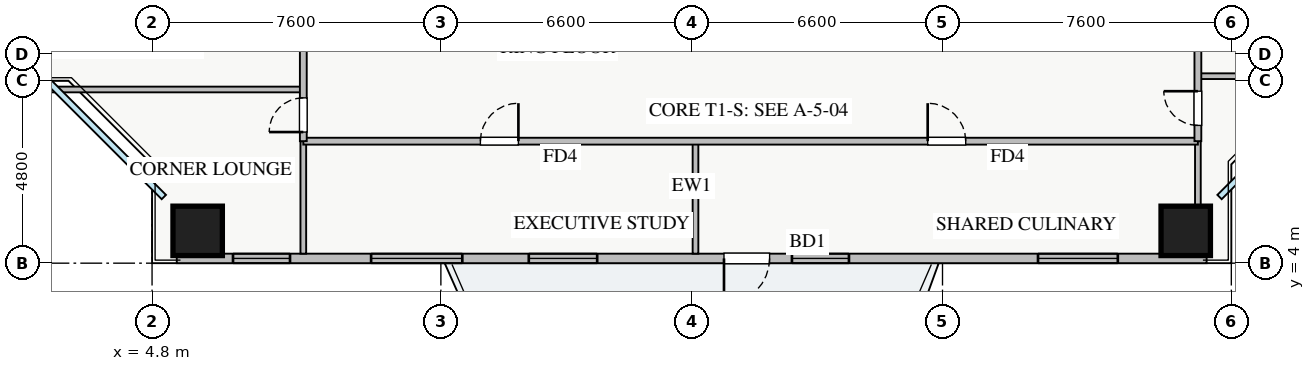
"""IFC4 building model, lengths in metres.
Left out: names, types, materials, properties, quantities, classifications, styles, units other than length and angle.
Written with IfcOpenShell. Run it as: python <this file> out.ifc"""

import sys

from ifc_helpers import new_model, si_unit, direction, frame, frame_2d, origin, origin_2d, place, context, subcontext, project, spatial, rectangle, extrude, source, transform, mapped, element, fill, save


model = new_model("IFC4")
c1 = context("Model", 3, precision=1e-05, world=origin(), true_north=direction((0.0, 1.0)))
c2 = subcontext(c1, "Body", "Model", "MODEL_VIEW")
j1 = project(units=[si_unit("LENGTHUNIT", "METRE"), si_unit("PLANEANGLEUNIT", "RADIAN")], contexts=[c1])
p1 = place(None, origin())
s1 = spatial("IfcSite", under=j1, at=p1, CompositionType="ELEMENT")
p2 = place(p1, origin())
s2 = spatial("IfcBuilding", under=s1, at=p2, CompositionType="ELEMENT")
p3 = place(p2, frame((0.0, 0.0, 76.25)))
s3 = spatial("IfcBuildingStorey", under=s2, at=p3, CompositionType="ELEMENT", Elevation=76.25)
m1 = source(origin(), c2, "Body", "SweptSolid", [
    extrude(rectangle(XDim=1.3, YDim=1.3, at=origin_2d()), origin(), (0.0, 0.0, 1.0), 3.25),
])
for number, where, z_axis, x_axis in (
    (1, (6.0, 4.85, 0.0), (0.0, 0.0, 1.0), (1.0, 0.0, 0.0)),
    (2, (32.0, 4.85, 0.0), (0.0, 0.0, 1.0), (1.0, 0.0, 0.0)),
):
    element("IfcColumn", number, at=place(p3, frame(where, z_axis=z_axis, x_axis=x_axis)), inside=s3, PredefinedType="COLUMN", context=c2, shape_type="MappedRepresentation", body=[
        mapped(m1, transform((0.0, 0.0, 0.0), x_axis=(1.0, 0.0, 0.0), y_axis=(0.0, 1.0, 0.0), z_axis=(0.0, 0.0, 1.0), scale=1.0)),
    ])
p4 = place(p3, frame((5.45, 4.125, 0.0), z_axis=(0.0, 0.0, 1.0), x_axis=(1.0, 0.0, 0.0)))
e3 = element("IfcWall", 3, at=p4, inside=s3, PredefinedType="STANDARD", context=c2, shape_type="SweptSolid", body=[
    extrude(rectangle(XDim=27.1, YDim=0.25, at=frame_2d((13.55, 0.0))), origin(), (0.0, 0.0, 1.0), 2.61),
])
p5 = place(p4, frame((14.4, 0.0, 0.0)))
e4 = element("IfcOpeningElement", 4, at=p5, cuts=e3, PredefinedType="OPENING", context=c2, shape_type="SweptSolid", body=[
    extrude(rectangle(XDim=1.2, YDim=2.1, at=frame_2d((0.6, 1.05))), frame((0.0, 0.135, 0.0), z_axis=(0.0, -1.0, 0.0), x_axis=(1.0, 0.0, 0.0)), (0.0, 0.0, 1.0), 0.27),
])
p6 = place(p4, frame((1.48, 0.0, 0.9)))
e5 = element("IfcOpeningElement", 5, at=p6, cuts=e3, PredefinedType="OPENING", context=c2, shape_type="SweptSolid", body=[
    extrude(rectangle(XDim=1.5, YDim=1.5, at=frame_2d((0.75, 0.75))), frame((0.0, 0.135, 0.0), z_axis=(0.0, -1.0, 0.0), x_axis=(1.0, 0.0, 0.0)), (0.0, 0.0, 1.0), 0.27),
])
p7 = place(p4, frame((9.263, 0.0, 0.9)))
e6 = element("IfcOpeningElement", 6, at=p7, cuts=e3, PredefinedType="OPENING", context=c2, shape_type="SweptSolid", body=[
    extrude(rectangle(XDim=1.8, YDim=1.45, at=frame_2d((0.9, 0.725))), frame((0.0, 0.135, 0.0), z_axis=(0.0, -1.0, 0.0), x_axis=(1.0, 0.0, 0.0)), (0.0, 0.0, 1.0), 0.27),
])
p8 = place(p4, frame((16.188, 0.0, 0.9)))
e7 = element("IfcOpeningElement", 7, at=p8, cuts=e3, PredefinedType="OPENING", context=c2, shape_type="SweptSolid", body=[
    extrude(rectangle(XDim=1.5, YDim=1.45, at=frame_2d((0.75, 0.725))), frame((0.0, 0.135, 0.0), z_axis=(0.0, -1.0, 0.0), x_axis=(1.0, 0.0, 0.0)), (0.0, 0.0, 1.0), 0.27),
])
p9 = place(p4, frame((22.663, 0.0, 0.9)))
e8 = element("IfcOpeningElement", 8, at=p9, cuts=e3, PredefinedType="OPENING", context=c2, shape_type="SweptSolid", body=[
    extrude(rectangle(XDim=2.1, YDim=1.48, at=frame_2d((1.05, 0.74))), frame((0.0, 0.135, 0.0), z_axis=(0.0, -1.0, 0.0), x_axis=(1.0, 0.0, 0.0)), (0.0, 0.0, 1.0), 0.27),
])
p10 = place(p4, frame((5.114, 0.0, 0.9)))
e9 = element("IfcOpeningElement", 9, at=p10, cuts=e3, PredefinedType="OPENING", context=c2, shape_type="SweptSolid", body=[
    extrude(rectangle(XDim=2.4, YDim=1.5, at=frame_2d((1.2, 0.75))), frame((0.0, 0.135, 0.0), z_axis=(0.0, -1.0, 0.0), x_axis=(1.0, 0.0, 0.0)), (0.0, 0.0, 1.0), 0.27),
])
p11 = place(p3, frame((19.1, 4.25, 0.0), z_axis=(0.0, 0.0, 1.0), x_axis=(0.0, 1.0, 0.0)))
e10 = element("IfcWall", 10, at=p11, inside=s3, PredefinedType="PARTITIONING", context=c2, shape_type="SweptSolid", body=[
    extrude(rectangle(XDim=2.96, YDim=0.15, at=frame_2d((1.48, 0.0))), origin(), (0.0, 0.0, 1.0), 2.815),
])
for number, where, z_axis, x_axis in (
    (11, (8.78, 4.25, 0.0), (0.0, 0.0, 1.0), (0.0, 1.0, 0.0)),
    (12, (32.32, 4.25, 0.0), (0.0, 0.0, 1.0), (0.0, 1.0, 0.0)),
):
    element("IfcWall", number, at=place(p3, frame(where, z_axis=z_axis, x_axis=x_axis)), inside=s3, PredefinedType="PARTITIONING", context=c2, shape_type="SweptSolid", body=[
        extrude(rectangle(XDim=2.96, YDim=0.15, at=frame_2d((1.48, 0.0))), origin(), (0.0, 0.0, 1.0), 3.07),
    ])
p12 = place(p3, frame((8.78, 7.21, 0.0), z_axis=(0.0, 0.0, 1.0), x_axis=(1.0, 0.0, 0.0)))
e13 = element("IfcWall", 13, at=p12, inside=s3, PredefinedType="PARTITIONING", context=c2, shape_type="SweptSolid", body=[
    extrude(rectangle(XDim=23.54, YDim=0.18, at=frame_2d((11.77, 0.0))), origin(), (0.0, 0.0, 1.0), 3.07),
])
p13 = place(p12, frame((4.66, 0.0, 0.0)))
e14 = element("IfcOpeningElement", 14, at=p13, cuts=e13, PredefinedType="OPENING", context=c2, shape_type="SweptSolid", body=[
    extrude(rectangle(XDim=1.0, YDim=2.05, at=frame_2d((0.5, 1.025))), frame((0.0, 0.1, 0.0), z_axis=(0.0, -1.0, 0.0), x_axis=(1.0, 0.0, 0.0)), (0.0, 0.0, 1.0), 0.2),
])
p14 = place(p12, frame((16.43, 0.0, 0.0)))
e15 = element("IfcOpeningElement", 15, at=p14, cuts=e13, PredefinedType="OPENING", context=c2, shape_type="SweptSolid", body=[
    extrude(rectangle(XDim=1.0, YDim=2.05, at=frame_2d((0.5, 1.025))), frame((0.0, 0.1, 0.0), z_axis=(0.0, -1.0, 0.0), x_axis=(1.0, 0.0, 0.0)), (0.0, 0.0, 1.0), 0.2),
])
p15 = place(p3, frame((0.25, 8.57, 0.0), z_axis=(0.0, 0.0, 1.0), x_axis=(1.0, 0.0, 0.0)))
e16 = element("IfcWall", 16, at=p15, inside=s3, PredefinedType="PARTITIONING", context=c2, shape_type="SweptSolid", body=[
    extrude(rectangle(XDim=8.53, YDim=0.15, at=frame_2d((4.265, 0.0))), origin(), (0.0, 0.0, 1.0), 3.07),
])
p16 = place(p3, frame((8.78, 7.21, 0.0), z_axis=(0.0, 0.0, 1.0), x_axis=(0.0, 1.0, 0.0)))
e17 = element("IfcWall", 17, at=p16, inside=s3, PredefinedType="PARTITIONING", context=c2, shape_type="SweptSolid", body=[
    extrude(rectangle(XDim=31.23, YDim=0.18, at=frame_2d((15.615, 0.0))), origin(), (0.0, 0.0, 1.0), 3.07),
])
p17 = place(p16, frame((30.09, 0.0, 0.0)))
e18 = element("IfcOpeningElement", 18, at=p17, cuts=e17, PredefinedType="OPENING", context=c2, shape_type="SweptSolid", body=[
    extrude(rectangle(XDim=0.9, YDim=2.05, at=frame_2d((0.45, 1.025))), frame((0.0, 0.1, 0.0), z_axis=(0.0, -1.0, 0.0), x_axis=(1.0, 0.0, 0.0)), (0.0, 0.0, 1.0), 0.2),
])
p18 = place(p16, frame((0.24, 0.0, 0.0)))
e19 = element("IfcOpeningElement", 19, at=p18, cuts=e17, PredefinedType="OPENING", context=c2, shape_type="SweptSolid", body=[
    extrude(rectangle(XDim=0.9, YDim=2.05, at=frame_2d((0.45, 1.025))), frame((0.0, 0.1, 0.0), z_axis=(0.0, -1.0, 0.0), x_axis=(1.0, 0.0, 0.0)), (0.0, 0.0, 1.0), 0.2),
])
p19 = place(p16, frame((2.84, 0.0, 0.0)))
e20 = element("IfcOpeningElement", 20, at=p19, cuts=e17, PredefinedType="OPENING", context=c2, shape_type="SweptSolid", body=[
    extrude(rectangle(XDim=1.0, YDim=2.05, at=frame_2d((0.5, 1.025))), frame((0.0, 0.1, 0.0), z_axis=(0.0, -1.0, 0.0), x_axis=(1.0, 0.0, 0.0)), (0.0, 0.0, 1.0), 0.2),
])
p20 = place(p16, frame((12.11, 0.0, 0.0)))
e21 = element("IfcOpeningElement", 21, at=p20, cuts=e17, PredefinedType="OPENING", context=c2, shape_type="SweptSolid", body=[
    extrude(rectangle(XDim=1.0, YDim=2.05, at=frame_2d((0.5, 1.025))), frame((0.0, 0.1, 0.0), z_axis=(0.0, -1.0, 0.0), x_axis=(1.0, 0.0, 0.0)), (0.0, 0.0, 1.0), 0.2),
])
p21 = place(p16, frame((24.62, 0.0, 0.0)))
e22 = element("IfcOpeningElement", 22, at=p21, cuts=e17, PredefinedType="OPENING", context=c2, shape_type="SweptSolid", body=[
    extrude(rectangle(XDim=1.0, YDim=2.05, at=frame_2d((0.5, 1.025))), frame((0.0, 0.1, 0.0), z_axis=(0.0, -1.0, 0.0), x_axis=(1.0, 0.0, 0.0)), (0.0, 0.0, 1.0), 0.2),
])
p22 = place(p3, frame((32.32, 8.92, 0.0), z_axis=(0.0, 0.0, 1.0), x_axis=(1.0, 0.0, 0.0)))
e23 = element("IfcWall", 23, at=p22, inside=s3, PredefinedType="PARTITIONING", context=c2, shape_type="SweptSolid", body=[
    extrude(rectangle(XDim=5.43, YDim=0.15, at=frame_2d((2.715, 0.0))), origin(), (0.0, 0.0, 1.0), 3.07),
])
p23 = place(p3, frame((32.32, 7.21, 0.0), z_axis=(0.0, 0.0, 1.0), x_axis=(0.0, 1.0, 0.0)))
e24 = element("IfcWall", 24, at=p23, inside=s3, PredefinedType="PARTITIONING", context=c2, shape_type="SweptSolid", body=[
    extrude(rectangle(XDim=31.23, YDim=0.18, at=frame_2d((15.615, 0.0))), origin(), (0.0, 0.0, 1.0), 2.815),
])
p24 = place(p23, frame((30.09, 0.0, 0.0)))
e25 = element("IfcOpeningElement", 25, at=p24, cuts=e24, PredefinedType="OPENING", context=c2, shape_type="SweptSolid", body=[
    extrude(rectangle(XDim=0.9, YDim=2.05, at=frame_2d((0.45, 1.025))), frame((0.0, 0.1, 0.0), z_axis=(0.0, -1.0, 0.0), x_axis=(1.0, 0.0, 0.0)), (0.0, 0.0, 1.0), 0.2),
])
p25 = place(p23, frame((0.415, 0.0, 0.0)))
e26 = element("IfcOpeningElement", 26, at=p25, cuts=e24, PredefinedType="OPENING", context=c2, shape_type="SweptSolid", body=[
    extrude(rectangle(XDim=0.9, YDim=2.05, at=frame_2d((0.45, 1.025))), frame((0.0, 0.1, 0.0), z_axis=(0.0, -1.0, 0.0), x_axis=(1.0, 0.0, 0.0)), (0.0, 0.0, 1.0), 0.2),
])
p26 = place(p23, frame((4.99, 0.0, 0.0)))
e27 = element("IfcOpeningElement", 27, at=p26, cuts=e24, PredefinedType="OPENING", context=c2, shape_type="SweptSolid", body=[
    extrude(rectangle(XDim=1.0, YDim=2.05, at=frame_2d((0.5, 1.025))), frame((0.0, 0.1, 0.0), z_axis=(0.0, -1.0, 0.0), x_axis=(1.0, 0.0, 0.0)), (0.0, 0.0, 1.0), 0.2),
])
p27 = place(p23, frame((19.355, 0.0, 0.0)))
e28 = element("IfcOpeningElement", 28, at=p27, cuts=e24, PredefinedType="OPENING", context=c2, shape_type="SweptSolid", body=[
    extrude(rectangle(XDim=1.0, YDim=2.05, at=frame_2d((0.5, 1.025))), frame((0.0, 0.1, 0.0), z_axis=(0.0, -1.0, 0.0), x_axis=(1.0, 0.0, 0.0)), (0.0, 0.0, 1.0), 0.2),
])
m2 = source(origin(), c2, "Body", "SweptSolid", [
    extrude(rectangle(XDim=1.2, YDim=2.1, at=frame_2d((0.6, 1.05))), frame((0.0, 0.025, 0.0), z_axis=(0.0, -1.0, 0.0), x_axis=(1.0, 0.0, 0.0)), (0.0, 0.0, 1.0), 0.05),
])
p28 = place(p5, frame((1.2, 0.0, 0.0), z_axis=(0.0, 0.0, 1.0), x_axis=(-1.0, 0.0, 0.0)))
e29 = element("IfcDoor", 29, at=p28, inside=s3, OperationType="SINGLE_SWING_LEFT", PredefinedType="DOOR", context=c2, shape_type="MappedRepresentation", body=[
    mapped(m2, transform((0.0, 0.0, 0.0), x_axis=(1.0, 0.0, 0.0), y_axis=(0.0, 1.0, 0.0), z_axis=(0.0, 0.0, 1.0), scale=1.0)),
])
fill(e4, e29)
m3 = source(origin(), c2, "Body", "SweptSolid", [
    extrude(rectangle(XDim=1.5, YDim=1.5, at=frame_2d((0.75, 0.75))), frame((0.0, 0.03, 0.0), z_axis=(0.0, -1.0, 0.0), x_axis=(1.0, 0.0, 0.0)), (0.0, 0.0, 1.0), 0.06),
])
p29 = place(p6, origin())
e30 = element("IfcWindow", 30, at=p29, inside=s3, PartitioningType="TRIPLE_PANEL_VERTICAL", PredefinedType="WINDOW", context=c2, shape_type="MappedRepresentation", body=[
    mapped(m3, transform((0.0, 0.0, 0.0), x_axis=(1.0, 0.0, 0.0), y_axis=(0.0, 1.0, 0.0), z_axis=(0.0, 0.0, 1.0), scale=1.0)),
])
fill(e5, e30)
m4 = source(origin(), c2, "Body", "SweptSolid", [
    extrude(rectangle(XDim=1.8, YDim=1.45, at=frame_2d((0.9, 0.725))), frame((0.0, 0.03, 0.0), z_axis=(0.0, -1.0, 0.0), x_axis=(1.0, 0.0, 0.0)), (0.0, 0.0, 1.0), 0.06),
])
p30 = place(p7, origin())
e31 = element("IfcWindow", 31, at=p30, inside=s3, PartitioningType="DOUBLE_PANEL_VERTICAL", PredefinedType="WINDOW", context=c2, shape_type="MappedRepresentation", body=[
    mapped(m4, transform((0.0, 0.0, 0.0), x_axis=(1.0, 0.0, 0.0), y_axis=(0.0, 1.0, 0.0), z_axis=(0.0, 0.0, 1.0), scale=1.0)),
])
fill(e6, e31)
m5 = source(origin(), c2, "Body", "SweptSolid", [
    extrude(rectangle(XDim=1.5, YDim=1.45, at=frame_2d((0.75, 0.725))), frame((0.0, 0.03, 0.0), z_axis=(0.0, -1.0, 0.0), x_axis=(1.0, 0.0, 0.0)), (0.0, 0.0, 1.0), 0.06),
])
p31 = place(p8, origin())
e32 = element("IfcWindow", 32, at=p31, inside=s3, PartitioningType="DOUBLE_PANEL_VERTICAL", PredefinedType="WINDOW", context=c2, shape_type="MappedRepresentation", body=[
    mapped(m5, transform((0.0, 0.0, 0.0), x_axis=(1.0, 0.0, 0.0), y_axis=(0.0, 1.0, 0.0), z_axis=(0.0, 0.0, 1.0), scale=1.0)),
])
fill(e7, e32)
m6 = source(origin(), c2, "Body", "SweptSolid", [
    extrude(rectangle(XDim=2.1, YDim=1.48, at=frame_2d((1.05, 0.74))), frame((0.0, 0.03, 0.0), z_axis=(0.0, -1.0, 0.0), x_axis=(1.0, 0.0, 0.0)), (0.0, 0.0, 1.0), 0.06),
])
p32 = place(p9, origin())
e33 = element("IfcWindow", 33, at=p32, inside=s3, PartitioningType="TRIPLE_PANEL_VERTICAL", PredefinedType="WINDOW", context=c2, shape_type="MappedRepresentation", body=[
    mapped(m6, transform((0.0, 0.0, 0.0), x_axis=(1.0, 0.0, 0.0), y_axis=(0.0, 1.0, 0.0), z_axis=(0.0, 0.0, 1.0), scale=1.0)),
])
fill(e8, e33)
m7 = source(origin(), c2, "Body", "SweptSolid", [
    extrude(rectangle(XDim=1.0, YDim=2.05, at=frame_2d((0.5, 1.025))), frame((0.0, 0.025, 0.0), z_axis=(0.0, -1.0, 0.0), x_axis=(1.0, 0.0, 0.0)), (0.0, 0.0, 1.0), 0.05),
])
p33 = place(p13, origin())
e34 = element("IfcDoor", 34, at=p33, inside=s3, OperationType="SINGLE_SWING_RIGHT", PredefinedType="DOOR", context=c2, shape_type="MappedRepresentation", body=[
    mapped(m7, transform((0.0, 0.0, 0.0), x_axis=(1.0, 0.0, 0.0), y_axis=(0.0, 1.0, 0.0), z_axis=(0.0, 0.0, 1.0), scale=1.0)),
])
fill(e14, e34)
p34 = place(p14, origin())
e35 = element("IfcDoor", 35, at=p34, inside=s3, OperationType="SINGLE_SWING_LEFT", PredefinedType="DOOR", context=c2, shape_type="MappedRepresentation", body=[
    mapped(m7, transform((0.0, 0.0, 0.0), x_axis=(1.0, 0.0, 0.0), y_axis=(0.0, 1.0, 0.0), z_axis=(0.0, 0.0, 1.0), scale=1.0)),
])
fill(e15, e35)
m8 = source(origin(), c2, "Body", "SweptSolid", [
    extrude(rectangle(XDim=0.9, YDim=2.05, at=frame_2d((0.45, 1.025))), frame((0.0, 0.025, 0.0), z_axis=(0.0, -1.0, 0.0), x_axis=(1.0, 0.0, 0.0)), (0.0, 0.0, 1.0), 0.05),
])
p35 = place(p18, origin())
e36 = element("IfcDoor", 36, at=p35, inside=s3, OperationType="SINGLE_SWING_LEFT", PredefinedType="DOOR", context=c2, shape_type="MappedRepresentation", body=[
    mapped(m8, transform((0.0, 0.0, 0.0), x_axis=(1.0, 0.0, 0.0), y_axis=(0.0, 1.0, 0.0), z_axis=(0.0, 0.0, 1.0), scale=1.0)),
])
fill(e19, e36)
p36 = place(p25, origin())
e37 = element("IfcDoor", 37, at=p36, inside=s3, OperationType="SINGLE_SWING_RIGHT", PredefinedType="DOOR", context=c2, shape_type="MappedRepresentation", body=[
    mapped(m8, transform((0.0, 0.0, 0.0), x_axis=(1.0, 0.0, 0.0), y_axis=(0.0, 1.0, 0.0), z_axis=(0.0, 0.0, 1.0), scale=1.0)),
])
fill(e26, e37)
m9 = source(origin(), c2, "Body", "SweptSolid", [
    extrude(rectangle(XDim=2.4, YDim=1.5, at=frame_2d((1.2, 0.75))), frame((0.0, 0.03, 0.0), z_axis=(0.0, -1.0, 0.0), x_axis=(1.0, 0.0, 0.0)), (0.0, 0.0, 1.0), 0.06),
])
p37 = place(p10, origin())
e38 = element("IfcWindow", 38, at=p37, inside=s3, PartitioningType="TRIPLE_PANEL_VERTICAL", PredefinedType="WINDOW", context=c2, shape_type="MappedRepresentation", body=[
    mapped(m9, transform((0.0, 0.0, 0.0), x_axis=(1.0, 0.0, 0.0), y_axis=(0.0, 1.0, 0.0), z_axis=(0.0, 0.0, 1.0), scale=1.0)),
])
fill(e9, e38)
save(model, sys.argv[1])
